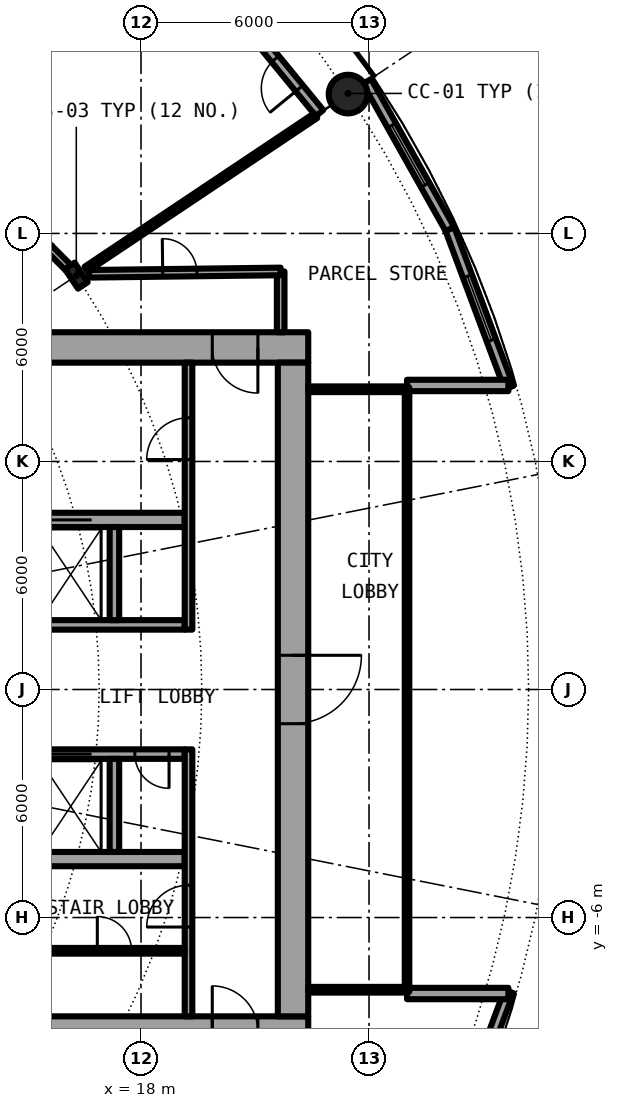
"""IFC4 building model, lengths in metres.
Left out: names, types, materials, properties, quantities, classifications, styles, units other than length and angle.
Written with IfcOpenShell. Run it as: python <this file> out.ifc"""

import sys

from ifc_helpers import new_model, si_unit, direction, frame, frame_2d, origin, origin_2d, place, context, subcontext, project, spatial, rectangle, hollow_circle, i_section, extrude, element, fill, save


model = new_model("IFC4")
c1 = context("Model", 3, precision=1e-05, world=origin(), true_north=direction((0.0, 1.0)))
c2 = subcontext(c1, "Body", "Model", "MODEL_VIEW")
j1 = project(units=[si_unit("LENGTHUNIT", "METRE"), si_unit("PLANEANGLEUNIT", "RADIAN")], contexts=[c1])
p1 = place(None, origin())
s1 = spatial("IfcSite", under=j1, at=p1, CompositionType="ELEMENT")
p2 = place(p1, origin())
s2 = spatial("IfcBuilding", under=s1, at=p2, CompositionType="ELEMENT")
p3 = place(p2, frame((0.0, 0.0, 53.3)))
s3 = spatial("IfcBuildingStorey", under=s2, at=p3, CompositionType="ELEMENT", Elevation=53.3)
p4 = place(p3, frame((23.448, 15.667, 0.0), z_axis=(0.0, 0.0, 1.0), x_axis=(1.0, 0.0, 0.0)))
e1 = element("IfcColumn", 1, at=p4, inside=s3, PredefinedType="COLUMN", context=c2, shape_type="SweptSolid", body=[
    extrude(hollow_circle(Radius=0.508, WallThickness=0.05, at=origin_2d()), origin(), (0.0, 0.0, 1.0), 4.2),
])
p5 = place(p3, frame((16.297, 10.889, 0.0), z_axis=(0.0, 0.0, 1.0), x_axis=(0.831469612303, 0.55557023302, 0.0)))
e2 = element("IfcColumn", 2, at=p5, inside=s3, PredefinedType="COLUMN", context=c2, shape_type="SweptSolid", body=[
    extrude(i_section(OverallWidth=0.305, OverallDepth=0.62, WebThickness=0.021, FlangeThickness=0.04, FilletRadius=0.027, at=origin_2d()), origin(), (0.0, 0.0, 1.0), 4.2),
])
p6 = place(p3, frame((22.699, 15.167, 0.0), z_axis=(0.0, 0.0, 1.0), x_axis=(-0.634382322723, 0.773019449054, 0.0)))
e3 = element("IfcWall", 3, at=p6, inside=s3, PredefinedType="SOLIDWALL", context=c2, shape_type="SweptSolid", body=[
    extrude(rectangle(XDim=5.352, YDim=0.25, at=frame_2d((2.676, 0.0))), origin(), (0.0, 0.0, 1.0), 3.8),
])
p7 = place(p6, frame((0.841, 0.0, 0.0)))
e4 = element("IfcOpeningElement", 4, at=p7, cuts=e3, PredefinedType="OPENING", context=c2, shape_type="SweptSolid", body=[
    extrude(rectangle(XDim=1.0, YDim=2.2, at=frame_2d((0.5, 1.1))), frame((0.0, 0.135, 0.0), z_axis=(0.0, -1.0, 0.0), x_axis=(1.0, 0.0, 0.0)), (0.0, 0.0, 1.0), 0.27),
])
p8 = place(p6, frame((3.51, 0.0, 0.0)))
e5 = element("IfcOpeningElement", 5, at=p8, cuts=e3, PredefinedType="OPENING", context=c2, shape_type="SweptSolid", body=[
    extrude(rectangle(XDim=1.0, YDim=2.2, at=frame_2d((0.5, 1.1))), frame((0.0, 0.135, 0.0), z_axis=(0.0, -1.0, 0.0), x_axis=(1.0, 0.0, 0.0)), (0.0, 0.0, 1.0), 0.27),
])
p9 = place(p3, frame((27.682, 7.945, 0.0), z_axis=(0.0, 0.0, 1.0), x_axis=(-0.349247811493, 0.937030397675, 0.0)))
e6 = element("IfcWall", 6, at=p9, inside=s3, PredefinedType="SOLIDWALL", context=c2, shape_type="SweptSolid", body=[
    extrude(rectangle(XDim=4.452, YDim=0.25, at=frame_2d((2.226, 0.0))), origin(), (0.0, 0.0, 1.0), 3.8),
])
p10 = place(p9, frame((1.327, 0.0, 0.3)))
e7 = element("IfcOpeningElement", 7, at=p10, cuts=e6, PredefinedType="OPENING", context=c2, shape_type="SweptSolid", body=[
    extrude(rectangle(XDim=1.8, YDim=2.1, at=frame_2d((0.9, 1.05))), frame((0.0, 0.135, 0.0), z_axis=(0.0, -1.0, 0.0), x_axis=(1.0, 0.0, 0.0)), (0.0, 0.0, 1.0), 0.27),
])
p11 = place(p3, frame((26.127, 12.117, 0.0), z_axis=(0.0, 0.0, 1.0), x_axis=(-0.489696356642, 0.871893042919, 0.0)))
e8 = element("IfcWall", 8, at=p11, inside=s3, PredefinedType="SOLIDWALL", context=c2, shape_type="SweptSolid", body=[
    extrude(rectangle(XDim=4.454, YDim=0.25, at=frame_2d((2.227, 0.0))), origin(), (0.0, 0.0, 1.0), 3.8),
])
p12 = place(p11, frame((1.327, 0.0, 0.3)))
e9 = element("IfcOpeningElement", 9, at=p12, cuts=e8, PredefinedType="OPENING", context=c2, shape_type="SweptSolid", body=[
    extrude(rectangle(XDim=1.8, YDim=2.1, at=frame_2d((0.9, 1.05))), frame((0.0, 0.135, 0.0), z_axis=(0.0, -1.0, 0.0), x_axis=(1.0, 0.0, 0.0)), (0.0, 0.0, 1.0), 0.27),
])
p13 = place(p3, frame((26.127, -12.117, 0.0), z_axis=(0.0, 0.0, 1.0), x_axis=(0.349247811493, 0.937030397675, 0.0)))
e10 = element("IfcWall", 10, at=p13, inside=s3, PredefinedType="SOLIDWALL", context=c2, shape_type="SweptSolid", body=[
    extrude(rectangle(XDim=4.452, YDim=0.25, at=frame_2d((2.226, 0.0))), origin(), (0.0, 0.0, 1.0), 3.8),
])
p14 = place(p13, frame((1.327, 0.0, 0.3)))
e11 = element("IfcOpeningElement", 11, at=p14, cuts=e10, PredefinedType="OPENING", context=c2, shape_type="SweptSolid", body=[
    extrude(rectangle(XDim=1.8, YDim=2.1, at=frame_2d((0.9, 1.05))), frame((0.0, 0.135, 0.0), z_axis=(0.0, -1.0, 0.0), x_axis=(1.0, 0.0, 0.0)), (0.0, 0.0, 1.0), 0.27),
])
for number, where, z_axis, x_axis in (
    (12, (25.0, 8.0, 0.0), (0.0, 0.0, 1.0), (1.0, 0.0, 0.0)),
    (13, (25.0, -8.0, 0.0), (0.0, 0.0, 1.0), (1.0, 0.0, 0.0)),
):
    element("IfcWall", number, at=place(p3, frame(where, z_axis=z_axis, x_axis=x_axis)), inside=s3, PredefinedType="SOLIDWALL", context=c2, shape_type="SweptSolid", body=[
        extrude(rectangle(XDim=2.667, YDim=0.3, at=frame_2d((1.333, 0.0))), origin(), (0.0, 0.0, 1.0), 3.8),
    ])
p15 = place(p3, frame((22.4, 9.0, 0.0), z_axis=(0.0, 0.0, 1.0), x_axis=(-1.0, 0.0, 0.0)))
e14 = element("IfcWall", 14, at=p15, inside=s3, PredefinedType="SHEAR", context=c2, shape_type="SweptSolid", body=[
    extrude(rectangle(XDim=14.2, YDim=0.8, at=frame_2d((7.1, 0.0))), origin(), (0.0, 0.0, 1.0), 4.2),
])
p16 = place(p15, frame((1.325, 0.0, 0.0)))
e15 = element("IfcOpeningElement", 15, at=p16, cuts=e14, PredefinedType="OPENING", context=c2, shape_type="SweptSolid", body=[
    extrude(rectangle(XDim=1.2, YDim=2.3, at=frame_2d((0.6, 1.15))), frame((0.0, 0.41, 0.0), z_axis=(0.0, -1.0, 0.0), x_axis=(1.0, 0.0, 0.0)), (0.0, 0.0, 1.0), 0.82),
])
p17 = place(p3, frame((8.2, -9.0, 0.0), z_axis=(0.0, 0.0, 1.0), x_axis=(1.0, 0.0, 0.0)))
e16 = element("IfcWall", 16, at=p17, inside=s3, PredefinedType="SHEAR", context=c2, shape_type="SweptSolid", body=[
    extrude(rectangle(XDim=14.2, YDim=0.8, at=frame_2d((7.1, 0.0))), origin(), (0.0, 0.0, 1.0), 4.2),
])
p18 = place(p17, frame((11.675, 0.0, 0.0)))
e17 = element("IfcOpeningElement", 17, at=p18, cuts=e16, PredefinedType="OPENING", context=c2, shape_type="SweptSolid", body=[
    extrude(rectangle(XDim=1.2, YDim=2.3, at=frame_2d((0.6, 1.15))), frame((0.0, 0.41, 0.0), z_axis=(0.0, -1.0, 0.0), x_axis=(1.0, 0.0, 0.0)), (0.0, 0.0, 1.0), 0.82),
])
p19 = place(p3, frame((22.0, 8.6, 0.0), z_axis=(0.0, 0.0, 1.0), x_axis=(0.0, -1.0, 0.0)))
e18 = element("IfcWall", 18, at=p19, inside=s3, PredefinedType="SHEAR", context=c2, shape_type="SweptSolid", body=[
    extrude(rectangle(XDim=17.2, YDim=0.8, at=frame_2d((8.6, 0.0))), origin(), (0.0, 0.0, 1.0), 4.2),
])
p20 = place(p19, frame((7.7, 0.0, 0.0)))
e19 = element("IfcOpeningElement", 19, at=p20, cuts=e18, PredefinedType="OPENING", context=c2, shape_type="SweptSolid", body=[
    extrude(rectangle(XDim=1.8, YDim=2.3, at=frame_2d((0.9, 1.15))), frame((0.0, 0.41, 0.0), z_axis=(0.0, -1.0, 0.0), x_axis=(1.0, 0.0, 0.0)), (0.0, 0.0, 1.0), 0.82),
])
p21 = place(p3, frame((9.0, 1.7, 0.0), z_axis=(0.0, 0.0, 1.0), x_axis=(1.0, 0.0, 0.0)))
e20 = element("IfcWall", 20, at=p21, inside=s3, PredefinedType="SHEAR", context=c2, shape_type="SweptSolid", body=[
    extrude(rectangle(XDim=10.15, YDim=0.25, at=frame_2d((5.075, 0.0))), origin(), (0.0, 0.0, 1.0), 4.2),
])
p22 = place(p21, frame((0.387, 0.0, 0.0)))
e21 = element("IfcOpeningElement", 21, at=p22, cuts=e20, PredefinedType="OPENING", context=c2, shape_type="SweptSolid", body=[
    extrude(rectangle(XDim=1.1, YDim=2.3, at=frame_2d((0.55, 1.15))), frame((0.0, 0.135, 0.0), z_axis=(0.0, -1.0, 0.0), x_axis=(1.0, 0.0, 0.0)), (0.0, 0.0, 1.0), 0.27),
])
p23 = place(p21, frame((2.45, 0.0, 0.0)))
e22 = element("IfcOpeningElement", 22, at=p23, cuts=e20, PredefinedType="OPENING", context=c2, shape_type="SweptSolid", body=[
    extrude(rectangle(XDim=1.1, YDim=2.3, at=frame_2d((0.55, 1.15))), frame((0.0, 0.135, 0.0), z_axis=(0.0, -1.0, 0.0), x_axis=(1.0, 0.0, 0.0)), (0.0, 0.0, 1.0), 0.27),
])
p24 = place(p21, frame((4.45, 0.0, 0.0)))
e23 = element("IfcOpeningElement", 23, at=p24, cuts=e20, PredefinedType="OPENING", context=c2, shape_type="SweptSolid", body=[
    extrude(rectangle(XDim=1.1, YDim=2.3, at=frame_2d((0.55, 1.15))), frame((0.0, 0.135, 0.0), z_axis=(0.0, -1.0, 0.0), x_axis=(1.0, 0.0, 0.0)), (0.0, 0.0, 1.0), 0.27),
])
p25 = place(p3, frame((9.0, 4.462, 0.0), z_axis=(0.0, 0.0, 1.0), x_axis=(1.0, 0.0, 0.0)))
e24 = element("IfcWall", 24, at=p25, inside=s3, PredefinedType="SHEAR", context=c2, shape_type="SweptSolid", body=[
    extrude(rectangle(XDim=10.15, YDim=0.375, at=frame_2d((5.075, 0.0))), origin(), (0.0, 0.0, 1.0), 4.2),
])
p26 = place(p25, frame((6.6, 0.0, 0.0)))
e25 = element("IfcOpeningElement", 25, at=p26, cuts=e24, PredefinedType="OPENING", context=c2, shape_type="SweptSolid", body=[
    extrude(rectangle(XDim=1.1, YDim=2.3, at=frame_2d((0.55, 1.15))), frame((0.0, 0.198, 0.0), z_axis=(0.0, -1.0, 0.0), x_axis=(1.0, 0.0, 0.0)), (0.0, 0.0, 1.0), 0.395),
])
p27 = place(p3, frame((17.3, 1.825, 0.0), z_axis=(0.0, 0.0, 1.0), x_axis=(0.0, 1.0, 0.0)))
e26 = element("IfcWall", 26, at=p27, inside=s3, PredefinedType="SOLIDWALL", context=c2, shape_type="SweptSolid", body=[
    extrude(rectangle(XDim=2.45, YDim=0.25, at=frame_2d((1.225, 0.0))), origin(), (0.0, 0.0, 1.0), 3.8),
])
p28 = place(p3, frame((19.25, 1.575, 0.0), z_axis=(0.0, 0.0, 1.0), x_axis=(0.0, 1.0, 0.0)))
e27 = element("IfcWall", 27, at=p28, inside=s3, PredefinedType="SOLIDWALL", context=c2, shape_type="SweptSolid", body=[
    extrude(rectangle(XDim=7.025, YDim=0.2, at=frame_2d((3.513, 0.0))), origin(), (0.0, 0.0, 1.0), 3.8),
])
p29 = place(p28, frame((4.475, 0.0, 0.0)))
e28 = element("IfcOpeningElement", 28, at=p29, cuts=e27, PredefinedType="OPENING", context=c2, shape_type="SweptSolid", body=[
    extrude(rectangle(XDim=1.1, YDim=2.3, at=frame_2d((0.55, 1.15))), frame((0.0, 0.11, 0.0), z_axis=(0.0, -1.0, 0.0), x_axis=(1.0, 0.0, 0.0)), (0.0, 0.0, 1.0), 0.22),
])
p30 = place(p3, frame((19.15, -1.7, 0.0), z_axis=(0.0, 0.0, 1.0), x_axis=(-1.0, 0.0, 0.0)))
e29 = element("IfcWall", 29, at=p30, inside=s3, PredefinedType="SHEAR", context=c2, shape_type="SweptSolid", body=[
    extrude(rectangle(XDim=10.15, YDim=0.25, at=frame_2d((5.075, 0.0))), origin(), (0.0, 0.0, 1.0), 4.2),
])
p31 = place(p30, frame((2.45, 0.0, 0.0)))
e30 = element("IfcOpeningElement", 30, at=p31, cuts=e29, PredefinedType="OPENING", context=c2, shape_type="SweptSolid", body=[
    extrude(rectangle(XDim=1.1, YDim=2.3, at=frame_2d((0.55, 1.15))), frame((0.0, 0.135, 0.0), z_axis=(0.0, -1.0, 0.0), x_axis=(1.0, 0.0, 0.0)), (0.0, 0.0, 1.0), 0.27),
])
p32 = place(p30, frame((8.087, 0.0, 0.0)))
e31 = element("IfcOpeningElement", 31, at=p32, cuts=e29, PredefinedType="OPENING", context=c2, shape_type="SweptSolid", body=[
    extrude(rectangle(XDim=0.9, YDim=2.3, at=frame_2d((0.45, 1.15))), frame((0.0, 0.135, 0.0), z_axis=(0.0, -1.0, 0.0), x_axis=(1.0, 0.0, 0.0)), (0.0, 0.0, 1.0), 0.27),
])
p33 = place(p30, frame((5.075, 0.0, 0.0)))
e32 = element("IfcOpeningElement", 32, at=p33, cuts=e29, PredefinedType="OPENING", context=c2, shape_type="SweptSolid", body=[
    extrude(rectangle(XDim=0.9, YDim=2.3, at=frame_2d((0.45, 1.15))), frame((0.0, 0.135, 0.0), z_axis=(0.0, -1.0, 0.0), x_axis=(1.0, 0.0, 0.0)), (0.0, 0.0, 1.0), 0.27),
])
p34 = place(p30, frame((0.413, 0.0, 0.0)))
e33 = element("IfcOpeningElement", 33, at=p34, cuts=e29, PredefinedType="OPENING", context=c2, shape_type="SweptSolid", body=[
    extrude(rectangle(XDim=0.9, YDim=2.3, at=frame_2d((0.45, 1.15))), frame((0.0, 0.135, 0.0), z_axis=(0.0, -1.0, 0.0), x_axis=(1.0, 0.0, 0.0)), (0.0, 0.0, 1.0), 0.27),
])
p35 = place(p3, frame((9.0, -4.462, 0.0), z_axis=(0.0, 0.0, 1.0), x_axis=(1.0, 0.0, 0.0)))
e34 = element("IfcWall", 34, at=p35, inside=s3, PredefinedType="SHEAR", context=c2, shape_type="SweptSolid", body=[
    extrude(rectangle(XDim=10.15, YDim=0.375, at=frame_2d((5.075, 0.0))), origin(), (0.0, 0.0, 1.0), 4.2),
])
p36 = place(p3, frame((17.3, -1.825, 0.0), z_axis=(0.0, 0.0, 1.0), x_axis=(0.0, -1.0, 0.0)))
e35 = element("IfcWall", 35, at=p36, inside=s3, PredefinedType="SOLIDWALL", context=c2, shape_type="SweptSolid", body=[
    extrude(rectangle(XDim=2.45, YDim=0.25, at=frame_2d((1.225, 0.0))), origin(), (0.0, 0.0, 1.0), 3.8),
])
p37 = place(p3, frame((19.25, -8.6, 0.0), z_axis=(0.0, 0.0, 1.0), x_axis=(0.0, 1.0, 0.0)))
e36 = element("IfcWall", 36, at=p37, inside=s3, PredefinedType="SOLIDWALL", context=c2, shape_type="SweptSolid", body=[
    extrude(rectangle(XDim=7.025, YDim=0.2, at=frame_2d((3.513, 0.0))), origin(), (0.0, 0.0, 1.0), 3.8),
])
p38 = place(p37, frame((2.35, 0.0, 0.0)))
e37 = element("IfcOpeningElement", 37, at=p38, cuts=e36, PredefinedType="OPENING", context=c2, shape_type="SweptSolid", body=[
    extrude(rectangle(XDim=1.1, YDim=2.3, at=frame_2d((0.55, 1.15))), frame((0.0, 0.11, 0.0), z_axis=(0.0, -1.0, 0.0), x_axis=(1.0, 0.0, 0.0)), (0.0, 0.0, 1.0), 0.22),
])
p39 = place(p3, frame((15.45, -6.875, 0.0), z_axis=(0.0, 0.0, 1.0), x_axis=(1.0, 0.0, 0.0)))
e38 = element("IfcWall", 38, at=p39, inside=s3, PredefinedType="PARTITIONING", context=c2, shape_type="SweptSolid", body=[
    extrude(rectangle(XDim=3.7, YDim=0.15, at=frame_2d((1.85, 0.0))), origin(), (0.0, 0.0, 1.0), 3.8),
])
p40 = place(p39, frame((1.4, 0.0, 0.0)))
e39 = element("IfcOpeningElement", 39, at=p40, cuts=e38, PredefinedType="OPENING", context=c2, shape_type="SweptSolid", body=[
    extrude(rectangle(XDim=0.9, YDim=2.3, at=frame_2d((0.45, 1.15))), frame((0.0, 0.085, 0.0), z_axis=(0.0, -1.0, 0.0), x_axis=(1.0, 0.0, 0.0)), (0.0, 0.0, 1.0), 0.17),
])
for number, where, z_axis, x_axis in (
    (40, (22.4, -7.9, 0.0), (0.0, 0.0, 1.0), (1.0, 0.0, 0.0)),
    (41, (22.4, 7.9, 0.0), (0.0, 0.0, 1.0), (1.0, 0.0, 0.0)),
):
    element("IfcWall", number, at=place(p3, frame(where, z_axis=z_axis, x_axis=x_axis)), inside=s3, PredefinedType="PARTITIONING", context=c2, shape_type="SweptSolid", body=[
        extrude(rectangle(XDim=2.54, YDim=0.15, at=frame_2d((1.27, 0.0))), origin(), (0.0, 0.0, 1.0), 3.8),
    ])
p41 = place(p3, frame((25.0, -7.95, 0.0), z_axis=(0.0, 0.0, 1.0), x_axis=(0.0, 1.0, 0.0)))
e42 = element("IfcWall", 42, at=p41, inside=s3, PredefinedType="PARTITIONING", context=c2, shape_type="SweptSolid", body=[
    extrude(rectangle(XDim=15.9, YDim=0.12, at=frame_2d((7.95, 0.0))), origin(), (0.0, 0.0, 1.0), 3.8),
])
p42 = place(p41, frame((0.95, 0.0, 0.1)))
e43 = element("IfcOpeningElement", 43, at=p42, cuts=e42, PredefinedType="OPENING", context=c2, shape_type="SweptSolid", body=[
    extrude(rectangle(XDim=14.0, YDim=3.0, at=frame_2d((7.0, 1.5))), frame((0.0, 0.07, 0.0), z_axis=(0.0, -1.0, 0.0), x_axis=(1.0, 0.0, 0.0)), (0.0, 0.0, 1.0), 0.14),
])
p43 = place(p3, frame((21.675, 9.4, 0.0), z_axis=(0.0, 0.0, 1.0), x_axis=(0.0, 1.0, 0.0)))
e44 = element("IfcWall", 44, at=p43, inside=s3, PredefinedType="PARTITIONING", context=c2, shape_type="SweptSolid", body=[
    extrude(rectangle(XDim=1.6, YDim=0.2, at=frame_2d((0.8, 0.0))), origin(), (0.0, 0.0, 1.0), 3.8),
])
p44 = place(p3, frame((16.555, 11.061, 0.0), z_axis=(0.0, 0.0, 1.0), x_axis=(0.831403467378, 0.55566921314, 0.0)))
e45 = element("IfcWall", 45, at=p44, inside=s3, PredefinedType="PARTITIONING", context=c2, shape_type="SweptSolid", body=[
    extrude(rectangle(XDim=7.265, YDim=0.15, at=frame_2d((3.632, 0.0))), origin(), (0.0, 0.0, 1.0), 3.8),
])
p45 = place(p3, frame((16.637, 10.938, 0.0), z_axis=(0.0, 0.0, 1.0), x_axis=(0.99992425795, 0.012307654658, 0.0)))
e46 = element("IfcWall", 46, at=p45, inside=s3, PredefinedType="PARTITIONING", context=c2, shape_type="SweptSolid", body=[
    extrude(rectangle(XDim=5.039, YDim=0.2, at=frame_2d((2.519, 0.0))), origin(), (0.0, 0.0, 1.0), 3.8),
])
p46 = place(p45, frame((1.934, 0.0, 0.0)))
e47 = element("IfcOpeningElement", 47, at=p46, cuts=e46, PredefinedType="OPENING", context=c2, shape_type="SweptSolid", body=[
    extrude(rectangle(XDim=0.9, YDim=2.3, at=frame_2d((0.45, 1.15))), frame((0.0, 0.11, 0.0), z_axis=(0.0, -1.0, 0.0), x_axis=(1.0, 0.0, 0.0)), (0.0, 0.0, 1.0), 0.22),
])
p47 = place(p3, frame((10.999, 16.187, 0.0), z_axis=(0.0, 0.0, 1.0), x_axis=(0.707106781187, -0.707106781187, 0.0)))
e48 = element("IfcWall", 48, at=p47, inside=s3, PredefinedType="PARTITIONING", context=c2, shape_type="SweptSolid", body=[
    extrude(rectangle(XDim=7.337, YDim=0.2, at=frame_2d((3.668, 0.0))), origin(), (0.0, 0.0, 1.0), 3.48),
])
p48 = place(p47, frame((2.768, 0.0, 0.0)))
e49 = element("IfcOpeningElement", 49, at=p48, cuts=e48, PredefinedType="OPENING", context=c2, shape_type="SweptSolid", body=[
    extrude(rectangle(XDim=1.8, YDim=2.3, at=frame_2d((0.9, 1.15))), frame((0.0, 0.11, 0.0), z_axis=(0.0, -1.0, 0.0), x_axis=(1.0, 0.0, 0.0)), (0.0, 0.0, 1.0), 0.22),
])
p49 = place(p7, origin())
e50 = element("IfcDoor", 50, at=p49, inside=s3, OperationType="SINGLE_SWING_LEFT", PredefinedType="DOOR", context=c2, shape_type="SweptSolid", body=[
    extrude(rectangle(XDim=1.0, YDim=2.2, at=frame_2d((0.5, 1.1))), frame((0.0, 0.025, 0.0), z_axis=(0.0, -1.0, 0.0), x_axis=(1.0, 0.0, 0.0)), (0.0, 0.0, 1.0), 0.05),
])
fill(e4, e50)
p50 = place(p10, origin())
e51 = element("IfcWindow", 51, at=p50, inside=s3, PartitioningType="SINGLE_PANEL", PredefinedType="WINDOW", context=c2, shape_type="SweptSolid", body=[
    extrude(rectangle(XDim=1.8, YDim=2.1, at=frame_2d((0.9, 1.05))), frame((0.0, 0.03, 0.0), z_axis=(0.0, -1.0, 0.0), x_axis=(1.0, 0.0, 0.0)), (0.0, 0.0, 1.0), 0.06),
])
fill(e7, e51)
p51 = place(p12, origin())
e52 = element("IfcWindow", 52, at=p51, inside=s3, PartitioningType="SINGLE_PANEL", PredefinedType="WINDOW", context=c2, shape_type="SweptSolid", body=[
    extrude(rectangle(XDim=1.8, YDim=2.1, at=frame_2d((0.9, 1.05))), frame((0.0, 0.03, 0.0), z_axis=(0.0, -1.0, 0.0), x_axis=(1.0, 0.0, 0.0)), (0.0, 0.0, 1.0), 0.06),
])
fill(e9, e52)
p52 = place(p26, origin())
e53 = element("IfcDoor", 53, at=p52, inside=s3, OperationType="DOUBLE_DOOR_SLIDING", PredefinedType="DOOR", context=c2, shape_type="SweptSolid", body=[
    extrude(rectangle(XDim=1.1, YDim=2.3, at=frame_2d((0.55, 1.15))), frame((0.0, 0.025, 0.0), z_axis=(0.0, -1.0, 0.0), x_axis=(1.0, 0.0, 0.0)), (0.0, 0.0, 1.0), 0.05),
])
fill(e25, e53)
p53 = place(p31, origin())
e54 = element("IfcDoor", 54, at=p53, inside=s3, OperationType="DOUBLE_DOOR_SLIDING", PredefinedType="DOOR", context=c2, shape_type="SweptSolid", body=[
    extrude(rectangle(XDim=1.1, YDim=2.3, at=frame_2d((0.55, 1.15))), frame((0.0, 0.025, 0.0), z_axis=(0.0, -1.0, 0.0), x_axis=(1.0, 0.0, 0.0)), (0.0, 0.0, 1.0), 0.05),
])
fill(e30, e54)
p54 = place(p34, origin())
e55 = element("IfcDoor", 55, at=p54, inside=s3, OperationType="SINGLE_SWING_RIGHT", PredefinedType="DOOR", context=c2, shape_type="SweptSolid", body=[
    extrude(rectangle(XDim=0.9, YDim=2.3, at=frame_2d((0.45, 1.15))), frame((0.0, 0.025, 0.0), z_axis=(0.0, -1.0, 0.0), x_axis=(1.0, 0.0, 0.0)), (0.0, 0.0, 1.0), 0.05),
])
fill(e33, e55)
p55 = place(p40, origin())
e56 = element("IfcDoor", 56, at=p55, inside=s3, OperationType="SINGLE_SWING_LEFT", PredefinedType="DOOR", context=c2, shape_type="SweptSolid", body=[
    extrude(rectangle(XDim=0.9, YDim=2.3, at=frame_2d((0.45, 1.15))), frame((0.0, 0.025, 0.0), z_axis=(0.0, -1.0, 0.0), x_axis=(1.0, 0.0, 0.0)), (0.0, 0.0, 1.0), 0.05),
])
fill(e39, e56)
p56 = place(p29, origin())
e57 = element("IfcDoor", 57, at=p56, inside=s3, OperationType="SINGLE_SWING_LEFT", PredefinedType="DOOR", context=c2, shape_type="SweptSolid", body=[
    extrude(rectangle(XDim=1.1, YDim=2.3, at=frame_2d((0.55, 1.15))), frame((0.0, 0.025, 0.0), z_axis=(0.0, -1.0, 0.0), x_axis=(1.0, 0.0, 0.0)), (0.0, 0.0, 1.0), 0.05),
])
fill(e28, e57)
p57 = place(p38, origin())
e58 = element("IfcDoor", 58, at=p57, inside=s3, OperationType="SINGLE_SWING_RIGHT", PredefinedType="DOOR", context=c2, shape_type="SweptSolid", body=[
    extrude(rectangle(XDim=1.1, YDim=2.3, at=frame_2d((0.55, 1.15))), frame((0.0, 0.025, 0.0), z_axis=(0.0, -1.0, 0.0), x_axis=(1.0, 0.0, 0.0)), (0.0, 0.0, 1.0), 0.05),
])
fill(e37, e58)
p58 = place(p16, origin())
e59 = element("IfcDoor", 59, at=p58, inside=s3, OperationType="SINGLE_SWING_RIGHT", PredefinedType="DOOR", context=c2, shape_type="SweptSolid", body=[
    extrude(rectangle(XDim=1.2, YDim=2.3, at=frame_2d((0.6, 1.15))), frame((0.0, 0.025, 0.0), z_axis=(0.0, -1.0, 0.0), x_axis=(1.0, 0.0, 0.0)), (0.0, 0.0, 1.0), 0.05),
])
fill(e15, e59)
p59 = place(p20, origin())
e60 = element("IfcDoor", 60, at=p59, inside=s3, OperationType="SINGLE_SWING_LEFT", PredefinedType="DOOR", context=c2, shape_type="SweptSolid", body=[
    extrude(rectangle(XDim=1.8, YDim=2.3, at=frame_2d((0.9, 1.15))), frame((0.0, 0.025, 0.0), z_axis=(0.0, -1.0, 0.0), x_axis=(1.0, 0.0, 0.0)), (0.0, 0.0, 1.0), 0.05),
])
fill(e19, e60)
p60 = place(p42, origin())
e61 = element("IfcWindow", 61, at=p60, inside=s3, PartitioningType="SINGLE_PANEL", PredefinedType="WINDOW", context=c2, shape_type="SweptSolid", body=[
    extrude(rectangle(XDim=14.0, YDim=3.0, at=frame_2d((7.0, 1.5))), frame((0.0, 0.03, 0.0), z_axis=(0.0, -1.0, 0.0), x_axis=(1.0, 0.0, 0.0)), (0.0, 0.0, 1.0), 0.06),
])
fill(e43, e61)
p61 = place(p46, origin())
e62 = element("IfcDoor", 62, at=p61, inside=s3, OperationType="SINGLE_SWING_LEFT", PredefinedType="DOOR", context=c2, shape_type="SweptSolid", body=[
    extrude(rectangle(XDim=0.9, YDim=2.3, at=frame_2d((0.45, 1.15))), frame((0.0, 0.025, 0.0), z_axis=(0.0, -1.0, 0.0), x_axis=(1.0, 0.0, 0.0)), (0.0, 0.0, 1.0), 0.05),
])
fill(e47, e62)
save(model, sys.argv[1])
